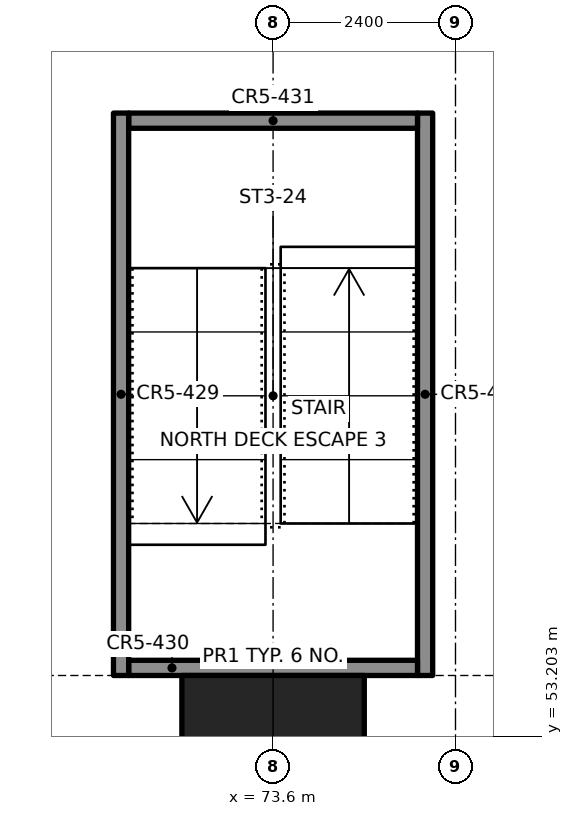
"""IFC4 building model, lengths in metres.
Left out: names, types, materials, properties, quantities, classifications, styles, units other than length and angle.
Written with IfcOpenShell. Run it as: python <this file> out.ifc"""

import sys

from ifc_helpers import new_model, si_unit, direction, frame, frame_2d, origin, origin_2d, place, context, subcontext, project, spatial, rectangle, extrude, element, save


model = new_model("IFC4")
c1 = context("Model", 3, precision=1e-05, world=origin(), true_north=direction((0.0, 1.0)))
c2 = subcontext(c1, "Body", "Model", "MODEL_VIEW")
j1 = project(units=[si_unit("LENGTHUNIT", "METRE"), si_unit("PLANEANGLEUNIT", "RADIAN")], contexts=[c1])
p1 = place(None, origin())
s1 = spatial("IfcSite", under=j1, at=p1, CompositionType="ELEMENT")
p2 = place(p1, origin())
s2 = spatial("IfcBuilding", under=s1, at=p2, CompositionType="ELEMENT")
p3 = place(p2, frame((0.0, 0.0, 4.4)))
s3 = spatial("IfcBuildingStorey", under=s2, at=p3, CompositionType="ELEMENT", Elevation=4.4)
p4 = place(p3, frame((73.6, 52.8, 0.0), z_axis=(0.0, 0.0, 1.0), x_axis=(1.0, 0.0, 0.0)))
e1 = element("IfcColumn", 1, at=p4, inside=s3, PredefinedType="COLUMN", context=c2, shape_type="SweptSolid", body=[
    extrude(rectangle(XDim=2.4, YDim=2.4, at=origin_2d()), origin(), (0.0, 0.0, 1.0), 4.4),
])
for number, where, z_axis, x_axis in (
    (2, (71.6, 54.0, 0.0), (0.0, 0.0, 1.0), (0.0, 1.0, 0.0)),
    (3, (75.6, 61.4, 0.0), (0.0, 0.0, 1.0), (0.0, -1.0, 0.0)),
):
    element("IfcWall", number, at=place(p3, frame(where, z_axis=z_axis, x_axis=x_axis)), inside=s3, PredefinedType="SOLIDWALL", context=c2, shape_type="SweptSolid", body=[
        extrude(rectangle(XDim=7.4, YDim=0.2, at=frame_2d((3.7, 0.0))), origin(), (0.0, 0.0, 1.0), 4.4),
    ])
for number, where, z_axis, x_axis in (
    (4, (71.7, 54.1, 0.0), (0.0, 0.0, 1.0), (1.0, 0.0, 0.0)),
    (5, (71.7, 61.3, 0.0), (0.0, 0.0, 1.0), (1.0, 0.0, 0.0)),
):
    element("IfcWall", number, at=place(p3, frame(where, z_axis=z_axis, x_axis=x_axis)), inside=s3, PredefinedType="SOLIDWALL", context=c2, shape_type="SweptSolid", body=[
        extrude(rectangle(XDim=3.8, YDim=0.2, at=frame_2d((1.9, 0.0))), origin(), (0.0, 0.0, 1.0), 4.4),
    ])
save(model, sys.argv[1])
